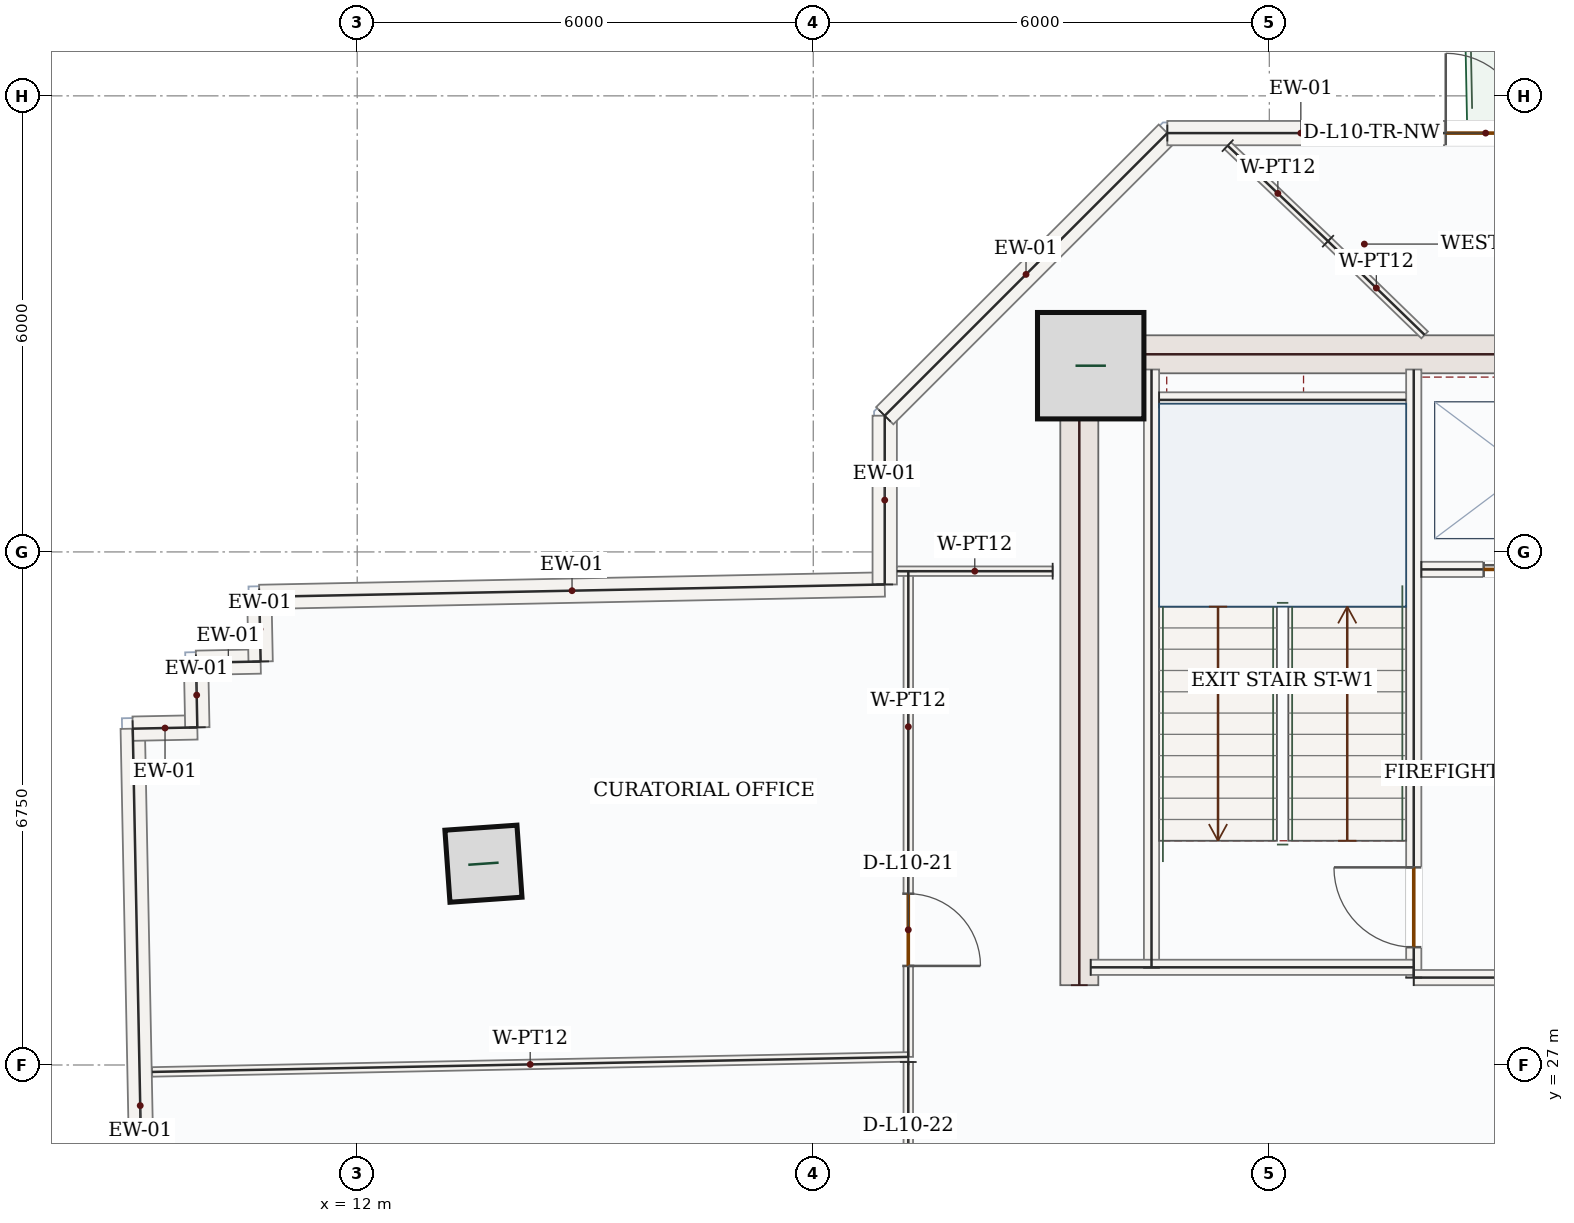
"""IFC4 building model, lengths in metres.
Left out: names, types, materials, properties, quantities, classifications, styles, units other than length and angle.
Written with IfcOpenShell. Run it as: python <this file> out.ifc"""

import sys

from ifc_helpers import new_model, si_unit, direction, frame, frame_2d, origin, origin_2d, place, context, subcontext, project, spatial, rectangle, hollow_rectangle, extrude, source, transform, mapped, element, fill, save


model = new_model("IFC4")
c1 = context("Model", 3, precision=1e-05, world=origin(), true_north=direction((0.0, 1.0)))
c2 = subcontext(c1, "Body", "Model", "MODEL_VIEW")
j1 = project(units=[si_unit("LENGTHUNIT", "METRE"), si_unit("PLANEANGLEUNIT", "RADIAN")], contexts=[c1])
p1 = place(None, origin())
s1 = spatial("IfcSite", under=j1, at=p1, CompositionType="ELEMENT")
p2 = place(p1, origin())
s2 = spatial("IfcBuilding", under=s1, at=p2, CompositionType="ELEMENT")
p3 = place(p2, frame((0.0, 0.0, 50.1)))
s3 = spatial("IfcBuildingStorey", under=s2, at=p3, CompositionType="ELEMENT", Elevation=50.1)
m1 = source(origin(), c2, "Body", "SweptSolid", [
    extrude(rectangle(XDim=8.55, YDim=0.5, at=frame_2d((4.275, 0.0))), origin(), (0.0, 0.0, 1.0), 3.95),
])
p4 = place(p3, frame((21.5, 28.05, 0.0), z_axis=(0.0, 0.0, 1.0), x_axis=(0.0, 1.0, 0.0)))
e1 = element("IfcWall", 1, at=p4, inside=s3, PredefinedType="SHEAR", context=c2, shape_type="MappedRepresentation", body=[
    mapped(m1, transform((0.0, 0.0, 0.0), x_axis=(1.0, 0.0, 0.0), y_axis=(0.0, 1.0, 0.0), z_axis=(0.0, 0.0, 1.0), scale=1.0)),
])
m2 = source(origin(), c2, "Body", "SweptSolid", [
    extrude(rectangle(XDim=7.0, YDim=0.5, at=frame_2d((3.5, 0.0))), origin(), (0.0, 0.0, 1.0), 3.95),
])
p5 = place(p3, frame((21.75, 36.35, 0.0), z_axis=(0.0, 0.0, 1.0), x_axis=(1.0, 0.0, 0.0)))
e2 = element("IfcWall", 2, at=p5, inside=s3, PredefinedType="SHEAR", context=c2, shape_type="MappedRepresentation", body=[
    mapped(m2, transform((0.0, 0.0, 0.0), x_axis=(1.0, 0.0, 0.0), y_axis=(0.0, 1.0, 0.0), z_axis=(0.0, 0.0, 1.0), scale=1.0)),
])
m3 = source(origin(), c2, "Body", "SweptSolid", [
    extrude(rectangle(XDim=1.4, YDim=1.4, at=origin_2d()), origin(), (0.0, 0.0, 1.0), 4.2),
])
p6 = place(p3, frame((21.65, 36.2, 0.0), z_axis=(0.0, 0.0, 1.0), x_axis=(1.0, 0.0, 0.0)))
e3 = element("IfcColumn", 3, at=p6, inside=s3, PredefinedType="COLUMN", context=c2, shape_type="MappedRepresentation", body=[
    mapped(m3, transform((0.0, 0.0, 0.0), x_axis=(1.0, 0.0, 0.0), y_axis=(0.0, 1.0, 0.0), z_axis=(0.0, 0.0, 1.0), scale=1.0)),
])
m4 = source(origin(), c2, "Body", "SweptSolid", [
    extrude(hollow_rectangle(XDim=0.95, YDim=0.95, WallThickness=0.05, at=origin_2d()), origin(), (0.0, 0.0, 1.0), 4.2),
])
p7 = place(p3, frame((13.661, 29.648, 0.0), z_axis=(0.0, 0.0, 1.0), x_axis=(0.99756405026, 0.069756473744, 0.0)))
e4 = element("IfcColumn", 4, at=p7, inside=s3, PredefinedType="COLUMN", context=c2, shape_type="MappedRepresentation", body=[
    mapped(m4, transform((0.0, 0.0, 0.0), x_axis=(1.0, 0.0, 0.0), y_axis=(0.0, 1.0, 0.0), z_axis=(0.0, 0.0, 1.0), scale=1.0)),
])
m5 = source(origin(), c2, "Body", "SweptSolid", [
    extrude(rectangle(XDim=9.92, YDim=0.32, at=frame_2d((4.96, 0.0))), origin(), (0.0, 0.0, 1.0), 3.95),
])
p8 = place(p3, frame((9.244, 21.507, 0.0), z_axis=(0.0, 0.0, 1.0), x_axis=(-0.019885787333, 0.99980225818, 0.0)))
e5 = element("IfcWall", 5, at=p8, inside=s3, PredefinedType="SOLIDWALL", context=c2, shape_type="MappedRepresentation", body=[
    mapped(m5, transform((0.0, 0.0, 0.0), x_axis=(1.0, 0.0, 0.0), y_axis=(0.0, 1.0, 0.0), z_axis=(0.0, 0.0, 1.0), scale=1.0)),
])
m6 = source(origin(), c2, "Body", "SweptSolid", [
    extrude(rectangle(XDim=0.85, YDim=0.32, at=frame_2d((0.425, 0.0))), origin(), (0.0, 0.0, 1.0), 3.95),
])
p9 = place(p3, frame((9.047, 31.425, 0.0), z_axis=(0.0, 0.0, 1.0), x_axis=(0.999803604205, 0.019817997326, 0.0)))
e6 = element("IfcWall", 6, at=p9, inside=s3, PredefinedType="SOLIDWALL", context=c2, shape_type="MappedRepresentation", body=[
    mapped(m6, transform((0.0, 0.0, 0.0), x_axis=(1.0, 0.0, 0.0), y_axis=(0.0, 1.0, 0.0), z_axis=(0.0, 0.0, 1.0), scale=1.0)),
])
m7 = source(origin(), c2, "Body", "SweptSolid", [
    extrude(rectangle(XDim=0.85, YDim=0.32, at=frame_2d((0.425, 0.0))), origin(), (0.0, 0.0, 1.0), 3.95),
])
p10 = place(p3, frame((9.896, 31.441, 0.0), z_axis=(0.0, 0.0, 1.0), x_axis=(-0.019812308004, 0.999803716962, 0.0)))
e7 = element("IfcWall", 7, at=p10, inside=s3, PredefinedType="SOLIDWALL", context=c2, shape_type="MappedRepresentation", body=[
    mapped(m7, transform((0.0, 0.0, 0.0), x_axis=(1.0, 0.0, 0.0), y_axis=(0.0, 1.0, 0.0), z_axis=(0.0, 0.0, 1.0), scale=1.0)),
])
for number, where, z_axis, x_axis in (
    (8, (9.88, 32.292, 0.0), (0.0, 0.0, 1.0), (1.0, 0.02, 0.0)),
    (9, (10.729, 32.308, 0.0), (0.0, 0.0, 1.0), (-0.02, 1.0, 0.0)),
):
    element("IfcWall", number, at=place(p3, frame(where, z_axis=z_axis, x_axis=x_axis)), inside=s3, PredefinedType="SOLIDWALL", context=c2, shape_type="MappedRepresentation", body=[
        mapped(m6, transform((0.0, 0.0, 0.0), x_axis=(1.0, 0.0, 0.0), y_axis=(0.0, 1.0, 0.0), z_axis=(0.0, 0.0, 1.0), scale=1.0)),
    ])
m8 = source(origin(), c2, "Body", "SweptSolid", [
    extrude(rectangle(XDim=8.229, YDim=0.32, at=frame_2d((4.115, 0.0))), origin(), (0.0, 0.0, 1.0), 3.95),
])
p11 = place(p3, frame((10.712, 33.158, 0.0), z_axis=(0.0, 0.0, 1.0), x_axis=(0.999801835372, 0.019907033577, 0.0)))
e10 = element("IfcWall", 10, at=p11, inside=s3, PredefinedType="SOLIDWALL", context=c2, shape_type="MappedRepresentation", body=[
    mapped(m8, transform((0.0, 0.0, 0.0), x_axis=(1.0, 0.0, 0.0), y_axis=(0.0, 1.0, 0.0), z_axis=(0.0, 0.0, 1.0), scale=1.0)),
])
m9 = source(origin(), c2, "Body", "SweptSolid", [
    extrude(rectangle(XDim=2.22, YDim=0.32, at=frame_2d((1.11, 0.0))), origin(), (0.0, 0.0, 1.0), 3.95),
])
p12 = place(p3, frame((18.94, 33.322, 0.0), z_axis=(0.0, 0.0, 1.0), x_axis=(0.0, 1.0, 0.0)))
e11 = element("IfcWall", 11, at=p12, inside=s3, PredefinedType="SOLIDWALL", context=c2, shape_type="MappedRepresentation", body=[
    mapped(m9, transform((0.0, 0.0, 0.0), x_axis=(1.0, 0.0, 0.0), y_axis=(0.0, 1.0, 0.0), z_axis=(0.0, 0.0, 1.0), scale=1.0)),
])
m10 = source(origin(), c2, "Body", "SweptSolid", [
    extrude(rectangle(XDim=5.258, YDim=0.32, at=frame_2d((2.629, 0.0))), origin(), (0.0, 0.0, 1.0), 3.95),
])
p13 = place(p3, frame((18.94, 35.542, 0.0), z_axis=(0.0, 0.0, 1.0), x_axis=(0.707106781187, 0.707106781187, 0.0)))
e12 = element("IfcWall", 12, at=p13, inside=s3, PredefinedType="SOLIDWALL", context=c2, shape_type="MappedRepresentation", body=[
    mapped(m10, transform((0.0, 0.0, 0.0), x_axis=(1.0, 0.0, 0.0), y_axis=(0.0, 1.0, 0.0), z_axis=(0.0, 0.0, 1.0), scale=1.0)),
])
p14 = place(p3, frame((22.658, 39.26, 0.0), z_axis=(0.0, 0.0, 1.0), x_axis=(1.0, 0.0, 0.0)))
e13 = element("IfcWall", 13, at=p14, inside=s3, PredefinedType="SOLIDWALL", context=c2, shape_type="SweptSolid", body=[
    extrude(rectangle(XDim=6.437, YDim=0.32, at=frame_2d((3.218, 0.0))), origin(), (0.0, 0.0, 1.0), 3.95),
])
p15 = place(p14, frame((3.663, 0.0, 0.0)))
e14 = element("IfcOpeningElement", 14, at=p15, cuts=e13, PredefinedType="OPENING", context=c2, shape_type="SweptSolid", body=[
    extrude(rectangle(XDim=1.05, YDim=2.15, at=frame_2d((0.525, 1.075))), frame((0.0, 0.17, 0.0), z_axis=(0.0, -1.0, 0.0), x_axis=(1.0, 0.0, 0.0)), (0.0, 0.0, 1.0), 0.34),
])
m11 = source(origin(), c2, "Body", "SweptSolid", [
    extrude(rectangle(XDim=7.87, YDim=0.2, at=frame_2d((3.935, 0.0))), origin(), (0.0, 0.0, 1.0), 3.95),
])
p16 = place(p3, frame((22.45, 28.28, 0.0), z_axis=(0.0, 0.0, 1.0), x_axis=(0.0, 1.0, 0.0)))
e15 = element("IfcWall", 15, at=p16, inside=s3, PredefinedType="SOLIDWALL", context=c2, shape_type="MappedRepresentation", body=[
    mapped(m11, transform((0.0, 0.0, 0.0), x_axis=(1.0, 0.0, 0.0), y_axis=(0.0, 1.0, 0.0), z_axis=(0.0, 0.0, 1.0), scale=1.0)),
])
p17 = place(p3, frame((25.9, 28.15, 0.0), z_axis=(0.0, 0.0, 1.0), x_axis=(0.0, 1.0, 0.0)))
e16 = element("IfcWall", 16, at=p17, inside=s3, PredefinedType="SOLIDWALL", context=c2, shape_type="SweptSolid", body=[
    extrude(rectangle(XDim=8.0, YDim=0.2, at=frame_2d((4.0, 0.0))), origin(), (0.0, 0.0, 1.0), 3.95),
])
p18 = place(p17, frame((0.4, 0.0, 0.0)))
e17 = element("IfcOpeningElement", 17, at=p18, cuts=e16, PredefinedType="OPENING", context=c2, shape_type="SweptSolid", body=[
    extrude(rectangle(XDim=1.05, YDim=2.15, at=frame_2d((0.525, 1.075))), frame((0.0, 0.11, 0.0), z_axis=(0.0, -1.0, 0.0), x_axis=(1.0, 0.0, 0.0)), (0.0, 0.0, 1.0), 0.22),
])
m12 = source(origin(), c2, "Body", "SweptSolid", [
    extrude(rectangle(XDim=4.25, YDim=0.2, at=frame_2d((2.125, 0.0))), origin(), (0.0, 0.0, 1.0), 3.95),
])
p19 = place(p3, frame((21.65, 28.285, 0.0), z_axis=(0.0, 0.0, 1.0), x_axis=(1.0, 0.0, 0.0)))
e18 = element("IfcWall", 18, at=p19, inside=s3, PredefinedType="SOLIDWALL", context=c2, shape_type="MappedRepresentation", body=[
    mapped(m12, transform((0.0, 0.0, 0.0), x_axis=(1.0, 0.0, 0.0), y_axis=(0.0, 1.0, 0.0), z_axis=(0.0, 0.0, 1.0), scale=1.0)),
])
m13 = source(origin(), c2, "Body", "SweptSolid", [
    extrude(rectangle(XDim=3.0, YDim=0.2, at=frame_2d((1.5, 0.0))), origin(), (0.0, 0.0, 1.0), 3.95),
])
p20 = place(p3, frame((25.9, 28.15, 0.0), z_axis=(0.0, 0.0, 1.0), x_axis=(1.0, 0.0, 0.0)))
e19 = element("IfcWall", 19, at=p20, inside=s3, PredefinedType="SOLIDWALL", context=c2, shape_type="MappedRepresentation", body=[
    mapped(m13, transform((0.0, 0.0, 0.0), x_axis=(1.0, 0.0, 0.0), y_axis=(0.0, 1.0, 0.0), z_axis=(0.0, 0.0, 1.0), scale=1.0)),
])
m14 = source(origin(), c2, "Body", "SweptSolid", [
    extrude(rectangle(XDim=3.25, YDim=0.2, at=frame_2d((1.625, 0.0))), origin(), (0.0, 0.0, 1.0), 3.95),
])
p21 = place(p3, frame((22.55, 35.75, 0.0), z_axis=(0.0, 0.0, 1.0), x_axis=(1.0, 0.0, 0.0)))
e20 = element("IfcWall", 20, at=p21, inside=s3, PredefinedType="SOLIDWALL", context=c2, shape_type="MappedRepresentation", body=[
    mapped(m14, transform((0.0, 0.0, 0.0), x_axis=(1.0, 0.0, 0.0), y_axis=(0.0, 1.0, 0.0), z_axis=(0.0, 0.0, 1.0), scale=1.0)),
])
p22 = place(p3, frame((26.0, 33.52, 0.0), z_axis=(0.0, 0.0, 1.0), x_axis=(1.0, 0.0, 0.0)))
e21 = element("IfcWall", 21, at=p22, inside=s3, PredefinedType="SOLIDWALL", context=c2, shape_type="SweptSolid", body=[
    extrude(rectangle(XDim=2.75, YDim=0.2, at=frame_2d((1.375, 0.0))), origin(), (0.0, 0.0, 1.0), 3.95),
])
p23 = place(p22, frame((0.82, 0.0, 0.0)))
e22 = element("IfcOpeningElement", 22, at=p23, cuts=e21, PredefinedType="OPENING", context=c2, shape_type="SweptSolid", body=[
    extrude(rectangle(XDim=1.1, YDim=2.15, at=frame_2d((0.55, 1.075))), frame((0.0, 0.11, 0.0), z_axis=(0.0, -1.0, 0.0), x_axis=(1.0, 0.0, 0.0)), (0.0, 0.0, 1.0), 0.22),
])
p24 = place(p3, frame((19.25, 33.496, 0.0), z_axis=(0.0, 0.0, 1.0), x_axis=(-7.6417545e-05, -0.99999999708, 0.0)))
e23 = element("IfcWall", 23, at=p24, inside=s3, PredefinedType="PARTITIONING", context=c2, shape_type="SweptSolid", body=[
    extrude(rectangle(XDim=6.39, YDim=0.125, at=frame_2d((3.195, 0.0))), origin(), (0.0, 0.0, 1.0), 3.95),
])
p25 = place(p24, frame((4.243, 0.0, 0.0)))
e24 = element("IfcOpeningElement", 24, at=p25, cuts=e23, PredefinedType="OPENING", context=c2, shape_type="SweptSolid", body=[
    extrude(rectangle(XDim=0.95, YDim=2.15, at=frame_2d((0.475, 1.075))), frame((0.0, 0.073, 0.0), z_axis=(0.0, -1.0, 0.0), x_axis=(1.0, 0.0, 0.0)), (0.0, 0.0, 1.0), 0.145),
])
m15 = source(origin(), c2, "Body", "SweptSolid", [
    extrude(rectangle(XDim=9.95, YDim=0.125, at=frame_2d((4.975, 0.0))), origin(), (0.0, 0.0, 1.0), 3.95),
])
p26 = place(p3, frame((19.25, 27.107, 0.0), z_axis=(0.0, 0.0, 1.0), x_axis=(-0.999802007469, -0.019898388379, 0.0)))
e25 = element("IfcWall", 25, at=p26, inside=s3, PredefinedType="PARTITIONING", context=c2, shape_type="MappedRepresentation", body=[
    mapped(m15, transform((0.0, 0.0, 0.0), x_axis=(1.0, 0.0, 0.0), y_axis=(0.0, 1.0, 0.0), z_axis=(0.0, 0.0, 1.0), scale=1.0)),
])
m16 = source(origin(), c2, "Body", "SweptSolid", [
    extrude(rectangle(XDim=1.823, YDim=0.125, at=frame_2d((0.911, 0.0))), origin(), (0.0, 0.0, 1.0), 3.95),
])
p27 = place(p3, frame((23.452, 39.095, 0.0), z_axis=(0.0, 0.0, 1.0), x_axis=(0.724303533388, -0.689481248129, 0.0)))
e26 = element("IfcWall", 26, at=p27, inside=s3, PredefinedType="PARTITIONING", context=c2, shape_type="MappedRepresentation", body=[
    mapped(m16, transform((0.0, 0.0, 0.0), x_axis=(1.0, 0.0, 0.0), y_axis=(0.0, 1.0, 0.0), z_axis=(0.0, 0.0, 1.0), scale=1.0)),
])
m17 = source(origin(), c2, "Body", "SweptSolid", [
    extrude(rectangle(XDim=1.771, YDim=0.125, at=frame_2d((0.885, 0.0))), origin(), (0.0, 0.0, 1.0), 3.95),
])
p28 = place(p3, frame((24.772, 37.838, 0.0), z_axis=(0.0, 0.0, 1.0), x_axis=(0.717777212316, -0.696272844135, 0.0)))
e27 = element("IfcWall", 27, at=p28, inside=s3, PredefinedType="PARTITIONING", context=c2, shape_type="MappedRepresentation", body=[
    mapped(m17, transform((0.0, 0.0, 0.0), x_axis=(1.0, 0.0, 0.0), y_axis=(0.0, 1.0, 0.0), z_axis=(0.0, 0.0, 1.0), scale=1.0)),
])
m18 = source(origin(), c2, "Body", "SweptSolid", [
    extrude(rectangle(XDim=2.049, YDim=0.125, at=frame_2d((1.025, 0.0))), origin(), (0.0, 0.0, 1.0), 3.95),
])
p29 = place(p3, frame((21.149, 33.497, 0.0), z_axis=(0.0, 0.0, 1.0), x_axis=(-0.999999992904, -0.000119132713, 0.0)))
e28 = element("IfcWall", 28, at=p29, inside=s3, PredefinedType="PARTITIONING", context=c2, shape_type="MappedRepresentation", body=[
    mapped(m18, transform((0.0, 0.0, 0.0), x_axis=(1.0, 0.0, 0.0), y_axis=(0.0, 1.0, 0.0), z_axis=(0.0, 0.0, 1.0), scale=1.0)),
])
p30 = place(p3, frame((19.25, 27.039, 0.0), z_axis=(0.0, 0.0, 1.0), x_axis=(0.0, -1.0, 0.0)))
e29 = element("IfcWall", 29, at=p30, inside=s3, PredefinedType="PARTITIONING", context=c2, shape_type="SweptSolid", body=[
    extrude(rectangle(XDim=6.533, YDim=0.125, at=frame_2d((3.267, 0.0))), origin(), (0.0, 0.0, 1.0), 3.95),
])
p31 = place(p30, frame((1.228, 0.0, 0.0)))
e30 = element("IfcOpeningElement", 30, at=p31, cuts=e29, PredefinedType="OPENING", context=c2, shape_type="SweptSolid", body=[
    extrude(rectangle(XDim=0.95, YDim=2.15, at=frame_2d((0.475, 1.075))), frame((0.0, 0.073, 0.0), z_axis=(0.0, -1.0, 0.0), x_axis=(1.0, 0.0, 0.0)), (0.0, 0.0, 1.0), 0.145),
])
m19 = source(origin(), c2, "Body", "SweptSolid", [
    extrude(rectangle(XDim=1.05, YDim=2.15, at=frame_2d((0.525, 1.075))), frame((0.0, 0.025, 0.0), z_axis=(0.0, -1.0, 0.0), x_axis=(1.0, 0.0, 0.0)), (0.0, 0.0, 1.0), 0.05),
])
p32 = place(p15, origin())
e31 = element("IfcDoor", 31, at=p32, inside=s3, OperationType="SINGLE_SWING_LEFT", PredefinedType="DOOR", context=c2, shape_type="MappedRepresentation", body=[
    mapped(m19, transform((0.0, 0.0, 0.0), x_axis=(1.0, 0.0, 0.0), y_axis=(0.0, 1.0, 0.0), z_axis=(0.0, 0.0, 1.0), scale=1.0)),
])
fill(e14, e31)
p33 = place(p18, origin())
e32 = element("IfcDoor", 32, at=p33, inside=s3, OperationType="SINGLE_SWING_RIGHT", PredefinedType="DOOR", context=c2, shape_type="MappedRepresentation", body=[
    mapped(m19, transform((0.0, 0.0, 0.0), x_axis=(1.0, 0.0, 0.0), y_axis=(0.0, 1.0, 0.0), z_axis=(0.0, 0.0, 1.0), scale=1.0)),
])
fill(e17, e32)
m20 = source(origin(), c2, "Body", "SweptSolid", [
    extrude(rectangle(XDim=1.1, YDim=2.15, at=frame_2d((0.55, 1.075))), frame((0.0, 0.025, 0.0), z_axis=(0.0, -1.0, 0.0), x_axis=(1.0, 0.0, 0.0)), (0.0, 0.0, 1.0), 0.05),
])
p34 = place(p23, origin())
e33 = element("IfcDoor", 33, at=p34, inside=s3, OperationType="DOUBLE_DOOR_SLIDING", PredefinedType="DOOR", context=c2, shape_type="MappedRepresentation", body=[
    mapped(m20, transform((0.0, 0.0, 0.0), x_axis=(1.0, 0.0, 0.0), y_axis=(0.0, 1.0, 0.0), z_axis=(0.0, 0.0, 1.0), scale=1.0)),
])
fill(e22, e33)
m21 = source(origin(), c2, "Body", "SweptSolid", [
    extrude(rectangle(XDim=0.95, YDim=2.15, at=frame_2d((0.475, 1.075))), frame((0.0, 0.025, 0.0), z_axis=(0.0, -1.0, 0.0), x_axis=(1.0, 0.0, 0.0)), (0.0, 0.0, 1.0), 0.05),
])
p35 = place(p25, origin())
e34 = element("IfcDoor", 34, at=p35, inside=s3, OperationType="SINGLE_SWING_RIGHT", PredefinedType="DOOR", context=c2, shape_type="MappedRepresentation", body=[
    mapped(m21, transform((0.0, 0.0, 0.0), x_axis=(1.0, 0.0, 0.0), y_axis=(0.0, 1.0, 0.0), z_axis=(0.0, 0.0, 1.0), scale=1.0)),
])
fill(e24, e34)
save(model, sys.argv[1])
